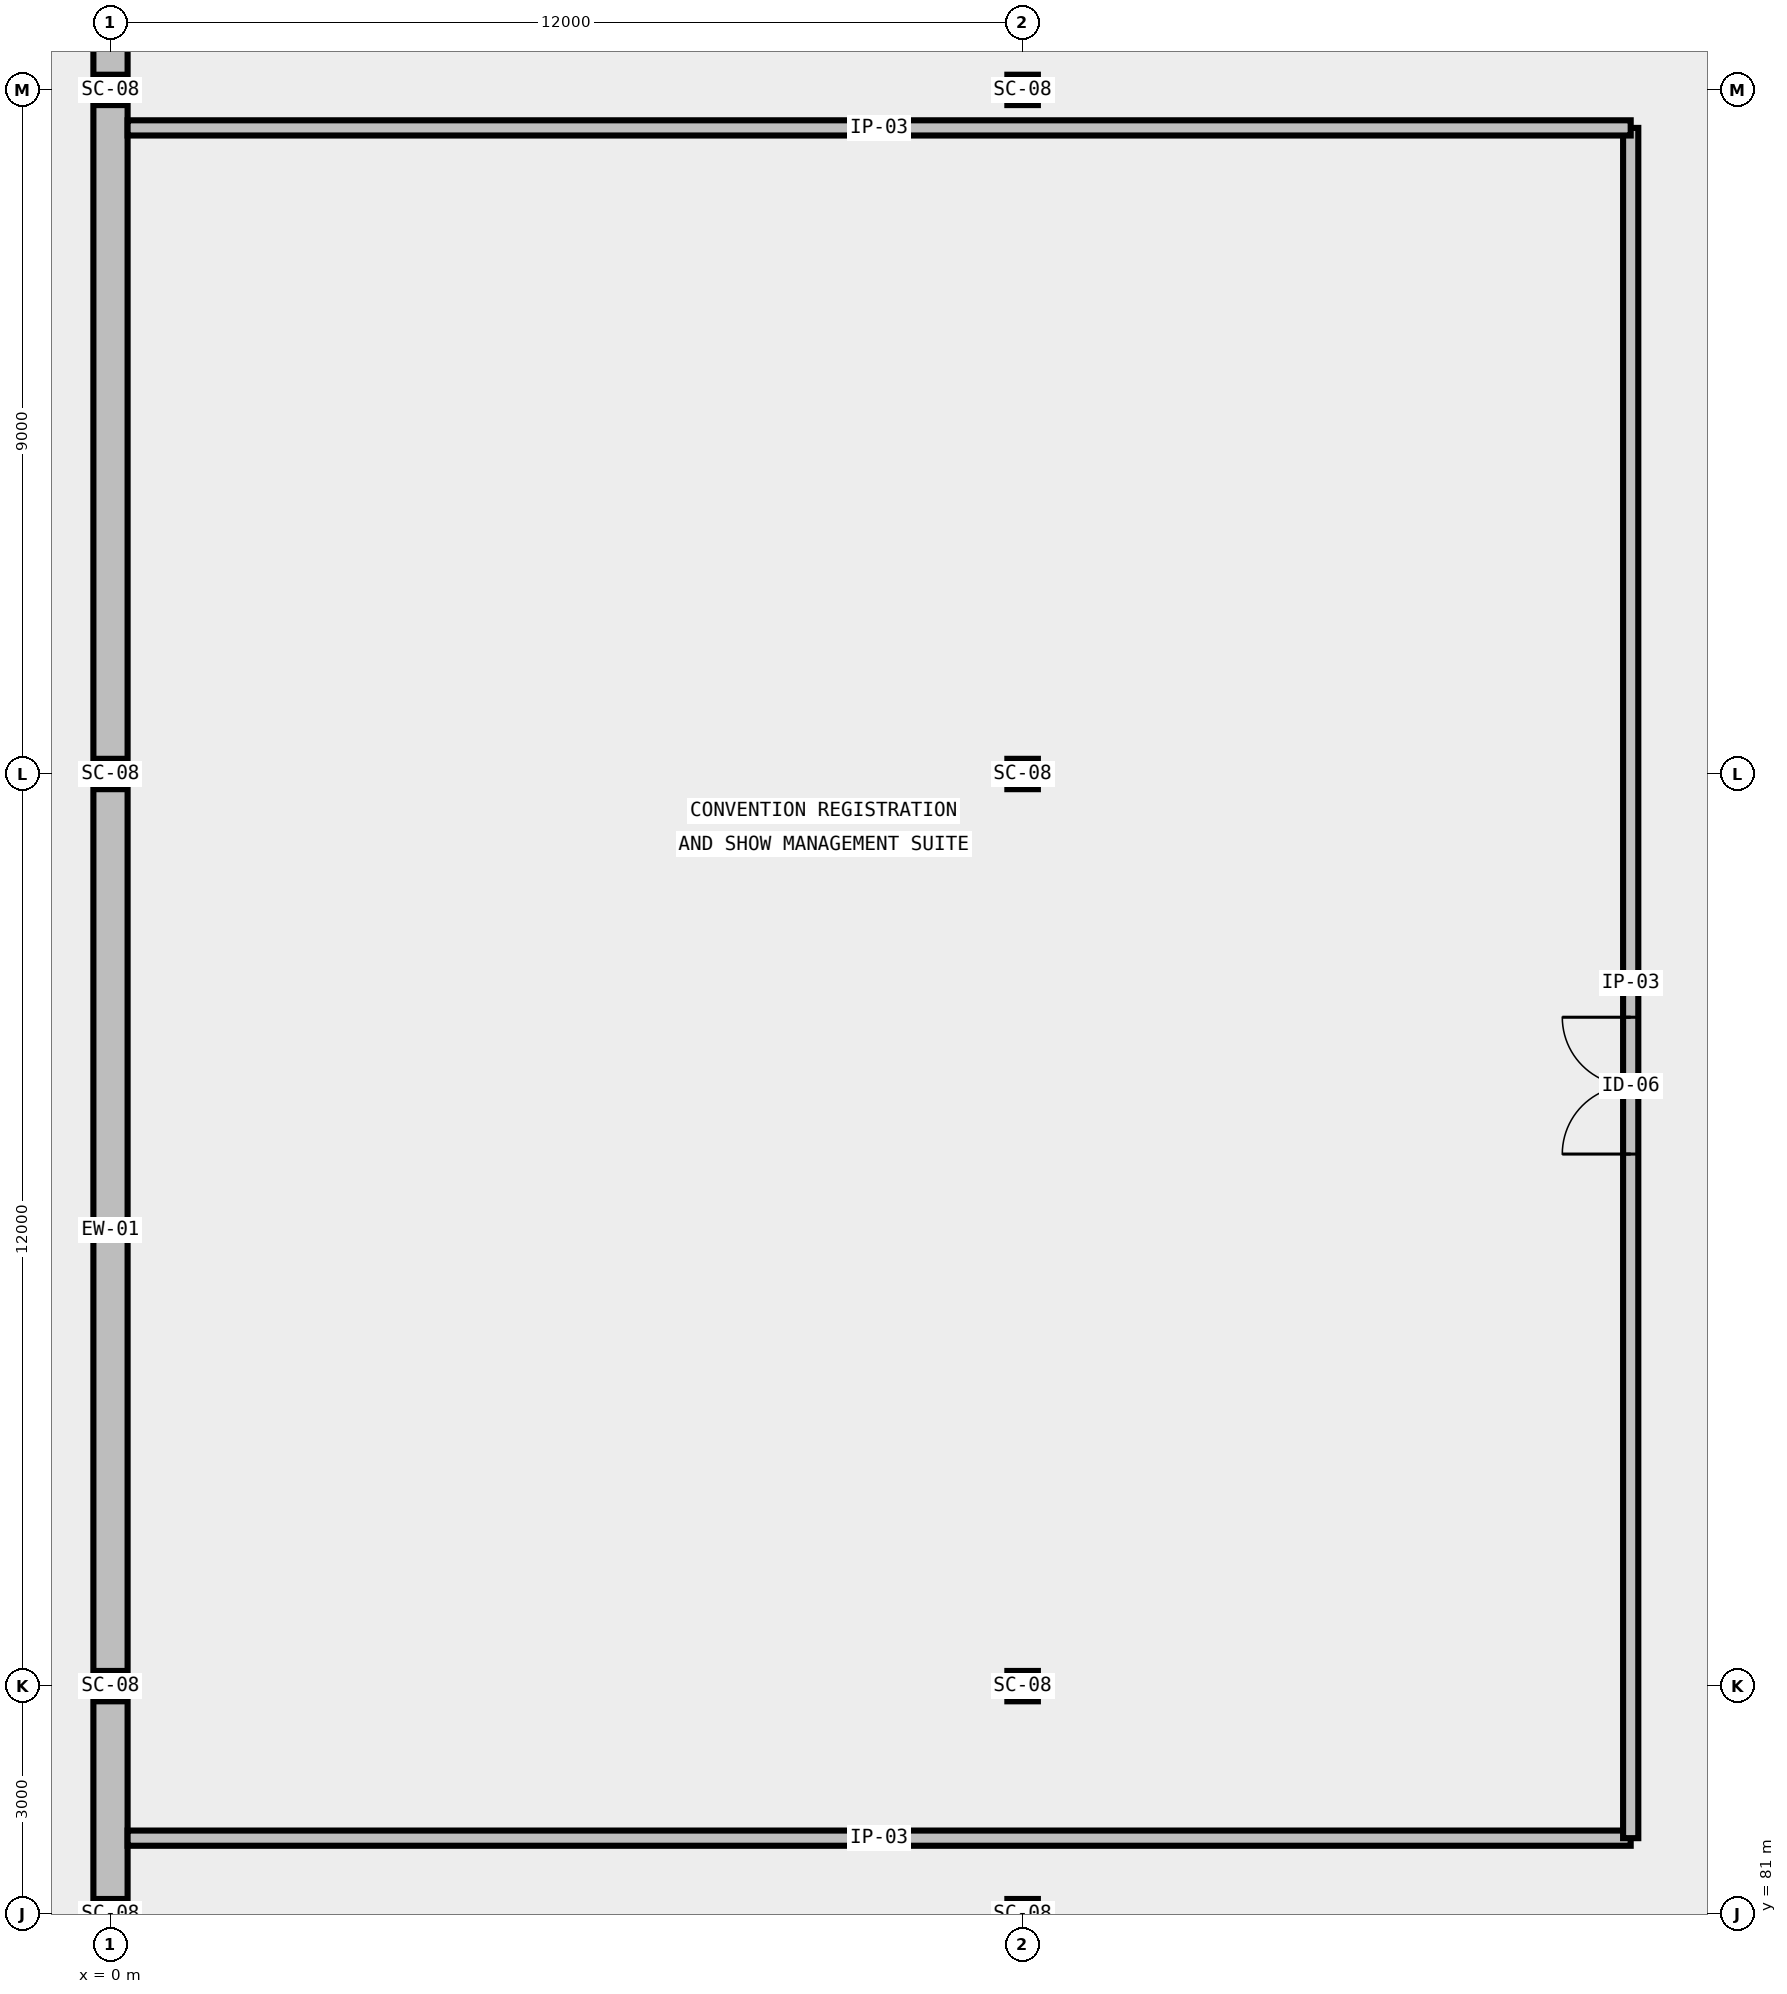
"""IFC4 building model, lengths in metres.
Left out: names, types, materials, properties, quantities, classifications, styles, units other than length and angle.
Written with IfcOpenShell. Run it as: python <this file> out.ifc"""

import sys

from ifc_helpers import new_model, si_unit, direction, frame, frame_2d, origin, origin_2d, place, context, subcontext, project, spatial, rectangle, i_section, extrude, element, fill, save


model = new_model("IFC4")
c1 = context("Model", 3, precision=1e-05, world=origin(), true_north=direction((0.0, 1.0)))
c2 = subcontext(c1, "Body", "Model", "MODEL_VIEW")
j1 = project(units=[si_unit("LENGTHUNIT", "METRE"), si_unit("PLANEANGLEUNIT", "RADIAN")], contexts=[c1])
p1 = place(None, origin())
s1 = spatial("IfcSite", under=j1, at=p1, CompositionType="ELEMENT")
p2 = place(p1, origin())
s2 = spatial("IfcBuilding", under=s1, at=p2, CompositionType="ELEMENT")
p3 = place(p2, origin())
s3 = spatial("IfcBuildingStorey", under=s2, at=p3, CompositionType="ELEMENT", Elevation=0.0)
for number, where, z_axis, x_axis in (
    (1, (0.0, 81.0, 0.0), (0.0, 0.0, 1.0), (1.0, 0.0, 0.0)),
    (2, (0.0, 84.0, 0.0), (0.0, 0.0, 1.0), (1.0, 0.0, 0.0)),
    (3, (0.0, 96.0, 0.0), (0.0, 0.0, 1.0), (1.0, 0.0, 0.0)),
    (4, (0.0, 105.0, 0.0), (0.0, 0.0, 1.0), (1.0, 0.0, 0.0)),
    (5, (12.0, 81.0, 0.0), (0.0, 0.0, 1.0), (1.0, 0.0, 0.0)),
    (6, (12.0, 84.0, 0.0), (0.0, 0.0, 1.0), (1.0, 0.0, 0.0)),
    (7, (12.0, 96.0, 0.0), (0.0, 0.0, 1.0), (1.0, 0.0, 0.0)),
    (8, (12.0, 105.0, 0.0), (0.0, 0.0, 1.0), (1.0, 0.0, 0.0)),
):
    element("IfcColumn", number, at=place(p3, frame(where, z_axis=z_axis, x_axis=x_axis)), inside=s3, PredefinedType="COLUMN", context=c2, shape_type="SweptSolid", body=[
        extrude(i_section(OverallWidth=0.401, OverallDepth=0.399, WebThickness=0.025, FlangeThickness=0.04, FilletRadius=0.031, at=origin_2d()), origin(), (0.0, 0.0, 1.0), 6.0),
    ])
p4 = place(p3, frame((0.0, 84.0, 0.0), z_axis=(0.0, 0.0, 1.0), x_axis=(0.0, -1.0, 0.0)))
e9 = element("IfcWall", 9, at=p4, inside=s3, PredefinedType="STANDARD", context=c2, shape_type="SweptSolid", body=[
    extrude(rectangle(XDim=3.0, YDim=0.45, at=frame_2d((1.5, 0.0))), origin(), (0.0, 0.0, 1.0), 5.269),
])
p5 = place(p3, frame((0.0, 96.0, 0.0), z_axis=(0.0, 0.0, 1.0), x_axis=(0.0, -1.0, 0.0)))
e10 = element("IfcWall", 10, at=p5, inside=s3, PredefinedType="STANDARD", context=c2, shape_type="SweptSolid", body=[
    extrude(rectangle(XDim=12.0, YDim=0.45, at=frame_2d((6.0, 0.0))), origin(), (0.0, 0.0, 1.0), 5.269),
])
p6 = place(p3, frame((0.0, 105.0, 0.0), z_axis=(0.0, 0.0, 1.0), x_axis=(0.0, -1.0, 0.0)))
e11 = element("IfcWall", 11, at=p6, inside=s3, PredefinedType="STANDARD", context=c2, shape_type="SweptSolid", body=[
    extrude(rectangle(XDim=9.0, YDim=0.45, at=frame_2d((4.5, 0.0))), origin(), (0.0, 0.0, 1.0), 5.269),
])
p7 = place(p3, frame((0.0, 117.0, 0.0), z_axis=(0.0, 0.0, 1.0), x_axis=(0.0, -1.0, 0.0)))
e12 = element("IfcWall", 12, at=p7, inside=s3, PredefinedType="STANDARD", context=c2, shape_type="SweptSolid", body=[
    extrude(rectangle(XDim=12.0, YDim=0.45, at=frame_2d((6.0, 0.0))), origin(), (0.0, 0.0, 1.0), 5.269),
])
p8 = place(p7, frame((2.2, 0.0, 0.0)))
e13 = element("IfcOpeningElement", 13, at=p8, cuts=e12, PredefinedType="OPENING", context=c2, shape_type="SweptSolid", body=[
    extrude(rectangle(XDim=1.85, YDim=2.25, at=frame_2d((0.925, 1.125))), frame((0.0, 0.24, 0.0), z_axis=(0.0, -1.0, 0.0), x_axis=(1.0, 0.0, 0.0)), (0.0, 0.0, 1.0), 0.48),
])
p9 = place(p3, frame((0.225, 82.0, 0.0), z_axis=(0.0, 0.0, 1.0), x_axis=(1.0, 0.0, 0.0)))
e14 = element("IfcWall", 14, at=p9, inside=s3, PredefinedType="PARTITIONING", context=c2, shape_type="SweptSolid", body=[
    extrude(rectangle(XDim=19.775, YDim=0.2, at=frame_2d((9.887, 0.0))), origin(), (0.0, 0.0, 1.0), 5.68),
])
p10 = place(p3, frame((20.0, 82.0, 0.0), z_axis=(0.0, 0.0, 1.0), x_axis=(0.0, 1.0, 0.0)))
e15 = element("IfcWall", 15, at=p10, inside=s3, PredefinedType="PARTITIONING", context=c2, shape_type="SweptSolid", body=[
    extrude(rectangle(XDim=22.5, YDim=0.2, at=frame_2d((11.25, 0.0))), origin(), (0.0, 0.0, 1.0), 5.68),
])
p11 = place(p10, frame((9.0, 0.0, 0.0)))
e16 = element("IfcOpeningElement", 16, at=p11, cuts=e15, PredefinedType="OPENING", context=c2, shape_type="SweptSolid", body=[
    extrude(rectangle(XDim=1.8, YDim=2.3, at=frame_2d((0.9, 1.15))), frame((0.0, 0.115, 0.0), z_axis=(0.0, -1.0, 0.0), x_axis=(1.0, 0.0, 0.0)), (0.0, 0.0, 1.0), 0.23),
])
p12 = place(p3, frame((20.0, 104.5, 0.0), z_axis=(0.0, 0.0, 1.0), x_axis=(-1.0, 0.0, 0.0)))
e17 = element("IfcWall", 17, at=p12, inside=s3, PredefinedType="PARTITIONING", context=c2, shape_type="SweptSolid", body=[
    extrude(rectangle(XDim=19.775, YDim=0.2, at=frame_2d((9.887, 0.0))), origin(), (0.0, 0.0, 1.0), 5.68),
])
p13 = place(p11, origin())
e18 = element("IfcDoor", 18, at=p13, inside=s3, OperationType="DOUBLE_DOOR_SINGLE_SWING", PredefinedType="DOOR", context=c2, shape_type="SweptSolid", body=[
    extrude(rectangle(XDim=1.8, YDim=2.3, at=frame_2d((0.9, 1.15))), frame((0.0, 0.025, 0.0), z_axis=(0.0, -1.0, 0.0), x_axis=(1.0, 0.0, 0.0)), (0.0, 0.0, 1.0), 0.05),
])
fill(e16, e18)
save(model, sys.argv[1])
